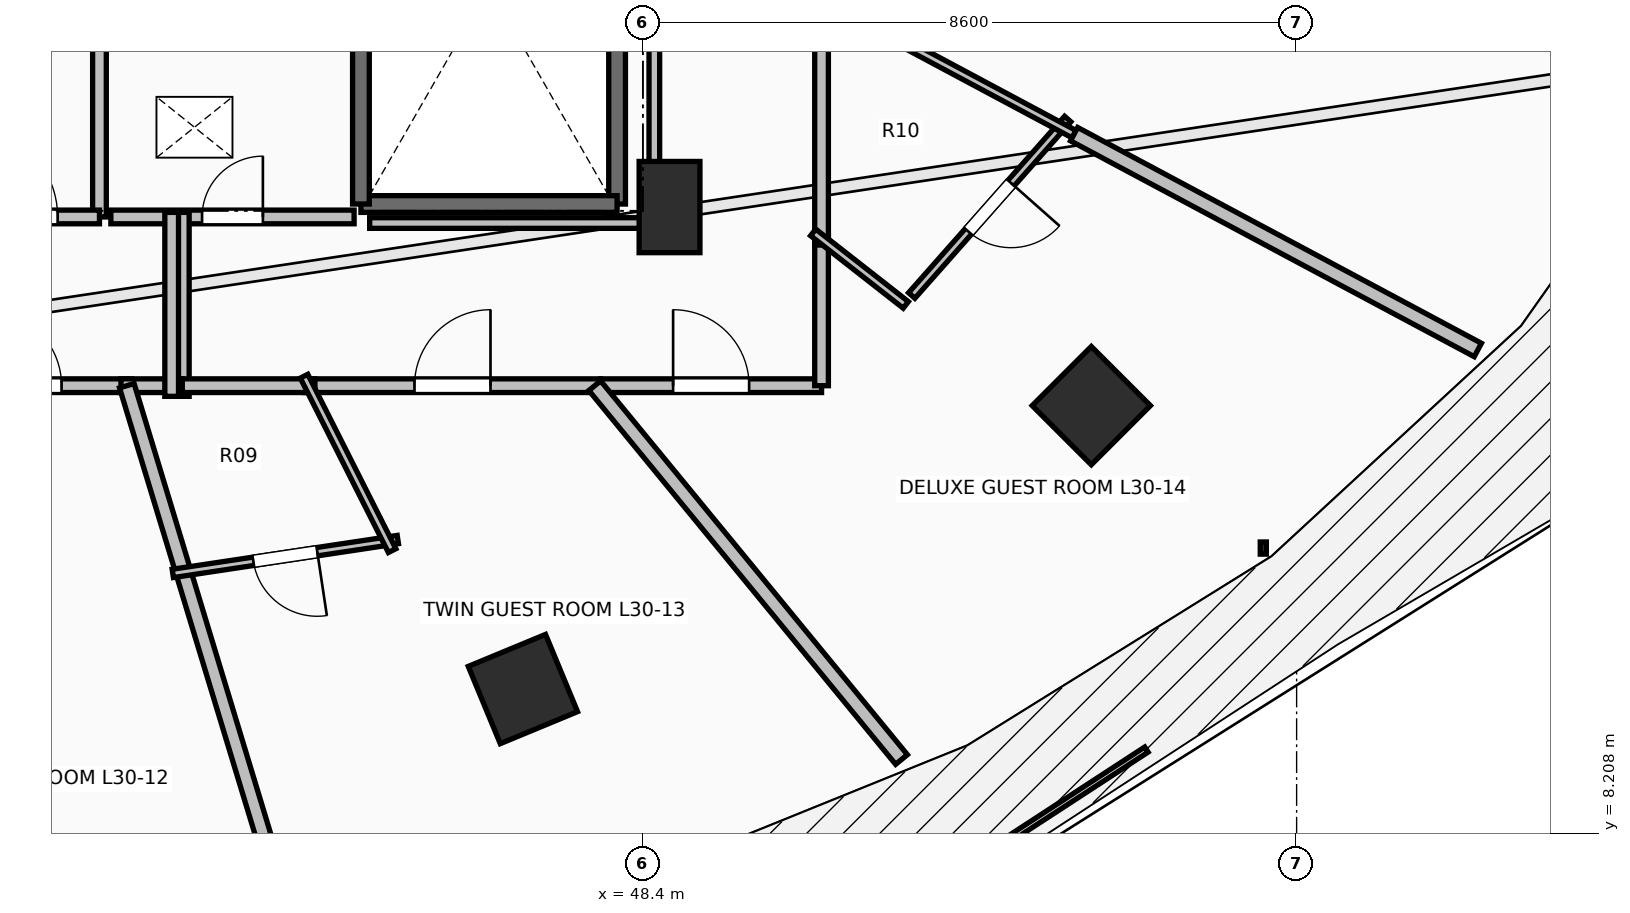
"""IFC4 building model, lengths in metres.
Left out: names, types, materials, properties, quantities, classifications, styles, units other than length and angle.
Written with IfcOpenShell. Run it as: python <this file> out.ifc"""

import sys

from ifc_helpers import new_model, si_unit, direction, frame, frame_2d, origin, origin_2d, place, context, subcontext, project, spatial, rectangle, extrude, element, fill, save


model = new_model("IFC4")
c1 = context("Model", 3, precision=1e-05, world=origin(), true_north=direction((0.0, 1.0)))
c2 = subcontext(c1, "Body", "Model", "MODEL_VIEW")
j1 = project(units=[si_unit("LENGTHUNIT", "METRE"), si_unit("PLANEANGLEUNIT", "RADIAN")], contexts=[c1])
p1 = place(None, origin())
s1 = spatial("IfcSite", under=j1, at=p1, CompositionType="ELEMENT")
p2 = place(p1, origin())
s2 = spatial("IfcBuilding", under=s1, at=p2, CompositionType="ELEMENT")
p3 = place(p2, frame((0.0, 0.0, 113.8)))
s3 = spatial("IfcBuildingStorey", under=s2, at=p3, CompositionType="ELEMENT", Elevation=113.8)
for number, where, z_axis, x_axis in (
    (1, (46.821, 10.109, 0.0), (0.0, 0.0, 1.0), (0.383, -0.924, 0.0)),
    (2, (54.299, 13.838, 0.0), (0.0, 0.0, 1.0), (0.707, -0.707, 0.0)),
):
    element("IfcColumn", number, at=place(p3, frame(where, z_axis=z_axis, x_axis=x_axis)), inside=s3, PredefinedType="COLUMN", context=c2, shape_type="SweptSolid", body=[
        extrude(rectangle(XDim=1.1, YDim=1.1, at=origin_2d()), origin(), (0.0, 0.0, 1.0), 3.5),
    ])
p4 = place(p3, frame((48.75, 16.45, 0.0), z_axis=(0.0, 0.0, 1.0), x_axis=(1.0, 0.0, 0.0)))
e3 = element("IfcColumn", 3, at=p4, inside=s3, PredefinedType="PILASTER", context=c2, shape_type="SweptSolid", body=[
    extrude(rectangle(XDim=0.8, YDim=1.2, at=origin_2d()), origin(), (0.0, 0.0, 1.0), 3.5),
])
p5 = place(p3, frame((48.06, 23.91, 0.0), z_axis=(0.0, 0.0, 1.0), x_axis=(0.0, -1.0, 0.0)))
e4 = element("IfcWall", 4, at=p5, inside=s3, PredefinedType="SOLIDWALL", context=c2, shape_type="SweptSolid", body=[
    extrude(rectangle(XDim=7.42, YDim=0.22, at=frame_2d((3.71, 0.0))), origin(), (0.0, 0.0, 1.0), 3.24),
])
p6 = place(p3, frame((48.06, 16.49, 0.0), z_axis=(0.0, 0.0, 1.0), x_axis=(-1.0, 0.0, 0.0)))
e5 = element("IfcWall", 5, at=p6, inside=s3, PredefinedType="SOLIDWALL", context=c2, shape_type="SweptSolid", body=[
    extrude(rectangle(XDim=3.37, YDim=0.22, at=frame_2d((1.685, 0.0))), origin(), (0.0, 0.0, 1.0), 3.24),
])
p7 = place(p3, frame((44.69, 16.49, 0.0), z_axis=(0.0, 0.0, 1.0), x_axis=(0.0, 1.0, 0.0)))
e6 = element("IfcWall", 6, at=p7, inside=s3, PredefinedType="SOLIDWALL", context=c2, shape_type="SweptSolid", body=[
    extrude(rectangle(XDim=7.42, YDim=0.22, at=frame_2d((3.71, 0.0))), origin(), (0.0, 0.0, 1.0), 3.24),
])
p8 = place(p3, frame((41.25, 16.32, 0.0), z_axis=(0.0, 0.0, 1.0), x_axis=(0.0, 1.0, 0.0)))
e7 = element("IfcWall", 7, at=p8, inside=s3, PredefinedType="PARTITIONING", context=c2, shape_type="SweptSolid", body=[
    extrude(rectangle(XDim=7.88, YDim=0.18, at=frame_2d((3.94, 0.0))), origin(), (0.0, 0.0, 1.0), 3.24),
])
p9 = place(p8, frame((3.54, 0.0, 0.0)))
e8 = element("IfcOpeningElement", 8, at=p9, cuts=e7, PredefinedType="OPENING", context=c2, shape_type="SweptSolid", body=[
    extrude(rectangle(XDim=0.8, YDim=2.05, at=frame_2d((0.4, 1.025))), frame((0.0, 0.105, 0.0), z_axis=(0.0, -1.0, 0.0), x_axis=(1.0, 0.0, 0.0)), (0.0, 0.0, 1.0), 0.21),
])
p10 = place(p3, frame((38.95, 16.32, 0.0), z_axis=(0.0, 0.0, 1.0), x_axis=(1.0, 0.0, 0.0)))
e9 = element("IfcWall", 9, at=p10, inside=s3, PredefinedType="PARTITIONING", context=c2, shape_type="SweptSolid", body=[
    extrude(rectangle(XDim=2.3, YDim=0.18, at=frame_2d((1.15, 0.0))), origin(), (0.0, 0.0, 1.0), 3.24),
])
p11 = place(p10, frame((0.55, 0.0, 0.0)))
e10 = element("IfcOpeningElement", 10, at=p11, cuts=e9, PredefinedType="OPENING", context=c2, shape_type="SweptSolid", body=[
    extrude(rectangle(XDim=1.2, YDim=2.15, at=frame_2d((0.6, 1.075))), frame((0.0, 0.105, 0.0), z_axis=(0.0, -1.0, 0.0), x_axis=(1.0, 0.0, 0.0)), (0.0, 0.0, 1.0), 0.21),
])
p12 = place(p3, frame((41.4, 16.32, 0.0), z_axis=(0.0, 0.0, 1.0), x_axis=(1.0, 0.0, 0.0)))
e11 = element("IfcWall", 11, at=p12, inside=s3, PredefinedType="PARTITIONING", context=c2, shape_type="SweptSolid", body=[
    extrude(rectangle(XDim=3.2, YDim=0.18, at=frame_2d((1.6, 0.0))), origin(), (0.0, 0.0, 1.0), 3.24),
])
p13 = place(p12, frame((1.2, 0.0, 0.0)))
e12 = element("IfcOpeningElement", 12, at=p13, cuts=e11, PredefinedType="OPENING", context=c2, shape_type="SweptSolid", body=[
    extrude(rectangle(XDim=0.8, YDim=2.05, at=frame_2d((0.4, 1.025))), frame((0.0, 0.105, 0.0), z_axis=(0.0, -1.0, 0.0), x_axis=(1.0, 0.0, 0.0)), (0.0, 0.0, 1.0), 0.21),
])
p14 = place(p3, frame((38.83, 14.1, 0.0), z_axis=(0.0, 0.0, 1.0), x_axis=(1.0, 0.0, 0.0)))
e13 = element("IfcWall", 13, at=p14, inside=s3, PredefinedType="PARTITIONING", context=c2, shape_type="SweptSolid", body=[
    extrude(rectangle(XDim=2.843, YDim=0.18, at=frame_2d((1.421, 0.0))), origin(), (0.0, 0.0, 1.0), 2.929),
])
p15 = place(p14, frame((0.921, 0.0, 0.0)))
e14 = element("IfcOpeningElement", 14, at=p15, cuts=e13, PredefinedType="OPENING", context=c2, shape_type="SweptSolid", body=[
    extrude(rectangle(XDim=1.0, YDim=2.15, at=frame_2d((0.5, 1.075))), frame((0.0, 0.105, 0.0), z_axis=(0.0, -1.0, 0.0), x_axis=(1.0, 0.0, 0.0)), (0.0, 0.0, 1.0), 0.21),
])
p16 = place(p3, frame((43.945, 14.1, 0.0), z_axis=(0.0, 0.0, 1.0), x_axis=(1.0, 0.0, 0.0)))
e15 = element("IfcWall", 15, at=p16, inside=s3, PredefinedType="PARTITIONING", context=c2, shape_type="SweptSolid", body=[
    extrude(rectangle(XDim=3.899, YDim=0.18, at=frame_2d((1.949, 0.0))), origin(), (0.0, 0.0, 1.0), 2.432),
])
p17 = place(p16, frame((1.449, 0.0, 0.0)))
e16 = element("IfcOpeningElement", 16, at=p17, cuts=e15, PredefinedType="OPENING", context=c2, shape_type="SweptSolid", body=[
    extrude(rectangle(XDim=1.0, YDim=2.15, at=frame_2d((0.5, 1.075))), frame((0.0, 0.105, 0.0), z_axis=(0.0, -1.0, 0.0), x_axis=(1.0, 0.0, 0.0)), (0.0, 0.0, 1.0), 0.21),
])
p18 = place(p3, frame((42.34, 16.38, 0.0), z_axis=(0.0, 0.0, 1.0), x_axis=(0.0, -1.0, 0.0)))
e17 = element("IfcWall", 17, at=p18, inside=s3, PredefinedType="PARTITIONING", context=c2, shape_type="SweptSolid", body=[
    extrude(rectangle(XDim=2.42, YDim=0.18, at=frame_2d((1.21, 0.0))), origin(), (0.0, 0.0, 1.0), 2.929),
])
p19 = place(p3, frame((42.2, 14.1, 0.0), z_axis=(0.0, 0.0, 1.0), x_axis=(1.0, 0.0, 0.0)))
e18 = element("IfcWall", 18, at=p19, inside=s3, PredefinedType="PARTITIONING", context=c2, shape_type="SweptSolid", body=[
    extrude(rectangle(XDim=1.885, YDim=0.18, at=frame_2d((0.942, 0.0))), origin(), (0.0, 0.0, 1.0), 2.929),
])
p20 = place(p3, frame((41.533, 14.1, 0.0), z_axis=(0.0, 0.0, 1.0), x_axis=(1.0, 0.0, 0.0)))
e19 = element("IfcWall", 19, at=p20, inside=s3, PredefinedType="PARTITIONING", context=c2, shape_type="SweptSolid", body=[
    extrude(rectangle(XDim=0.807, YDim=0.18, at=frame_2d((0.404, 0.0))), origin(), (0.0, 0.0, 1.0), 2.929),
])
p21 = place(p3, frame((42.2, 13.96, 0.0), z_axis=(0.0, 0.0, 1.0), x_axis=(0.0, 1.0, 0.0)))
e20 = element("IfcWall", 20, at=p21, inside=s3, PredefinedType="PARTITIONING", context=c2, shape_type="SweptSolid", body=[
    extrude(rectangle(XDim=2.42, YDim=0.18, at=frame_2d((1.21, 0.0))), origin(), (0.0, 0.0, 1.0), 2.929),
])
p22 = place(p3, frame((47.844, 14.1, 0.0), z_axis=(0.0, 0.0, 1.0), x_axis=(1.0, 0.0, 0.0)))
e21 = element("IfcWall", 21, at=p22, inside=s3, PredefinedType="PARTITIONING", context=c2, shape_type="SweptSolid", body=[
    extrude(rectangle(XDim=2.906, YDim=0.18, at=frame_2d((1.453, 0.0))), origin(), (0.0, 0.0, 1.0), 2.432),
])
p23 = place(p22, frame((0.953, 0.0, 0.0)))
e22 = element("IfcOpeningElement", 22, at=p23, cuts=e21, PredefinedType="OPENING", context=c2, shape_type="SweptSolid", body=[
    extrude(rectangle(XDim=1.0, YDim=2.15, at=frame_2d((0.5, 1.075))), frame((0.0, 0.105, 0.0), z_axis=(0.0, -1.0, 0.0), x_axis=(1.0, 0.0, 0.0)), (0.0, 0.0, 1.0), 0.21),
])
p24 = place(p3, frame((50.75, 14.1, 0.0), z_axis=(0.0, 0.0, 1.0), x_axis=(0.0, 1.0, 0.0)))
e23 = element("IfcWall", 23, at=p24, inside=s3, PredefinedType="PARTITIONING", context=c2, shape_type="SweptSolid", body=[
    extrude(rectangle(XDim=1.99, YDim=0.18, at=frame_2d((0.995, 0.0))), origin(), (0.0, 0.0, 1.0), 2.432),
])
p25 = place(p3, frame((50.75, 15.95, 0.0), z_axis=(0.0, 0.0, 1.0), x_axis=(0.0, 1.0, 0.0)))
e24 = element("IfcWall", 24, at=p25, inside=s3, PredefinedType="PARTITIONING", context=c2, shape_type="SweptSolid", body=[
    extrude(rectangle(XDim=3.435, YDim=0.18, at=frame_2d((1.718, 0.0))), origin(), (0.0, 0.0, 1.0), 2.929),
])
p26 = place(p3, frame((43.855, 6.7, 0.0), z_axis=(0.0, 0.0, 1.0), x_axis=(-0.290292155577, 0.956938067176, 0.0)))
e25 = element("IfcWall", 25, at=p26, inside=s3, PredefinedType="PARTITIONING", context=c2, shape_type="SweptSolid", body=[
    extrude(rectangle(XDim=7.733, YDim=0.2, at=frame_2d((3.867, 0.0))), origin(), (0.0, 0.0, 1.0), 2.432),
])
p27 = place(p3, frame((45.175, 12.076, 0.0), z_axis=(0.0, 0.0, 1.0), x_axis=(-0.988865063855, -0.148814937044, 0.0)))
e26 = element("IfcWall", 26, at=p27, inside=s3, PredefinedType="PARTITIONING", context=c2, shape_type="SweptSolid", body=[
    extrude(rectangle(XDim=2.994, YDim=0.11, at=frame_2d((1.497, 0.0))), origin(), (0.0, 0.0, 1.0), 2.432),
])
p28 = place(p27, frame((1.072, 0.0, 0.0)))
e27 = element("IfcOpeningElement", 27, at=p28, cuts=e26, PredefinedType="OPENING", context=c2, shape_type="SweptSolid", body=[
    extrude(rectangle(XDim=0.85, YDim=2.1, at=frame_2d((0.425, 1.05))), frame((0.0, 0.07, 0.0), z_axis=(0.0, -1.0, 0.0), x_axis=(1.0, 0.0, 0.0)), (0.0, 0.0, 1.0), 0.14),
])
p29 = place(p3, frame((43.942, 14.225, 0.0), z_axis=(0.0, 0.0, 1.0), x_axis=(0.450515334881, -0.892768689548, 0.0)))
e28 = element("IfcWall", 28, at=p29, inside=s3, PredefinedType="PARTITIONING", context=c2, shape_type="SweptSolid", body=[
    extrude(rectangle(XDim=2.571, YDim=0.11, at=frame_2d((1.285, 0.0))), origin(), (0.0, 0.0, 1.0), 2.432),
])
p30 = place(p3, frame((51.802, 9.182, 0.0), z_axis=(0.0, 0.0, 1.0), x_axis=(-0.634357186002, 0.773040076948, 0.0)))
e29 = element("IfcWall", 29, at=p30, inside=s3, PredefinedType="PARTITIONING", context=c2, shape_type="SweptSolid", body=[
    extrude(rectangle(XDim=6.362, YDim=0.2, at=frame_2d((3.181, 0.0))), origin(), (0.0, 0.0, 1.0), 2.432),
])
p31 = place(p3, frame((53.989, 17.608, 0.0), z_axis=(0.0, 0.0, 1.0), x_axis=(-0.662322264705, -0.749219071885, 0.0)))
e30 = element("IfcWall", 30, at=p31, inside=s3, PredefinedType="PARTITIONING", context=c2, shape_type="SweptSolid", body=[
    extrude(rectangle(XDim=3.099, YDim=0.11, at=frame_2d((1.549, 0.0))), origin(), (0.0, 0.0, 1.0), 2.886),
])
p32 = place(p31, frame((1.125, 0.0, 0.0)))
e31 = element("IfcOpeningElement", 31, at=p32, cuts=e30, PredefinedType="OPENING", context=c2, shape_type="SweptSolid", body=[
    extrude(rectangle(XDim=0.85, YDim=2.1, at=frame_2d((0.425, 1.05))), frame((0.0, 0.07, 0.0), z_axis=(0.0, -1.0, 0.0), x_axis=(1.0, 0.0, 0.0)), (0.0, 0.0, 1.0), 0.14),
])
p33 = place(p3, frame((51.858, 15.163, 0.0), z_axis=(0.0, 0.0, 1.0), x_axis=(-0.787564922247, 0.61623168796, 0.0)))
e32 = element("IfcWall", 32, at=p33, inside=s3, PredefinedType="PARTITIONING", context=c2, shape_type="SweptSolid", body=[
    extrude(rectangle(XDim=1.548, YDim=0.11, at=frame_2d((0.774, 0.0))), origin(), (0.0, 0.0, 1.0), 2.432),
])
p34 = place(p3, frame((54.073, 17.409, 0.0), z_axis=(0.0, 0.0, 1.0), x_axis=(-0.881911515214, 0.47141497572, 0.0)))
e33 = element("IfcWall", 33, at=p34, inside=s3, PredefinedType="PARTITIONING", context=c2, shape_type="SweptSolid", body=[
    extrude(rectangle(XDim=3.907, YDim=0.11, at=frame_2d((1.954, 0.0))), origin(), (0.0, 0.0, 1.0), 2.886),
])
p35 = place(p3, frame((59.384, 14.57, 0.0), z_axis=(0.0, 0.0, 1.0), x_axis=(-0.881918302895, 0.471402277274, 0.0)))
e34 = element("IfcWall", 34, at=p35, inside=s3, PredefinedType="PARTITIONING", context=c2, shape_type="SweptSolid", body=[
    extrude(rectangle(XDim=6.023, YDim=0.2, at=frame_2d((3.011, 0.0))), origin(), (0.0, 0.0, 1.0), 2.677),
])
p36 = place(p3, frame((48.55, 23.754, 0.0), z_axis=(0.0, 0.0, 1.0), x_axis=(0.0, -1.0, 0.0)))
e35 = element("IfcWall", 35, at=p36, inside=s3, PredefinedType="PARTITIONING", context=c2, shape_type="SweptSolid", body=[
    extrude(rectangle(XDim=7.514, YDim=0.14, at=frame_2d((3.757, 0.0))), origin(), (0.0, 0.0, 1.0), 2.432),
])
p37 = place(p3, frame((48.55, 16.24, 0.0), z_axis=(0.0, 0.0, 1.0), x_axis=(-1.0, 0.0, 0.0)))
e36 = element("IfcWall", 36, at=p37, inside=s3, PredefinedType="PARTITIONING", context=c2, shape_type="SweptSolid", body=[
    extrude(rectangle(XDim=3.745, YDim=0.14, at=frame_2d((1.873, 0.0))), origin(), (0.0, 0.0, 1.0), 2.432),
])
p38 = place(p11, origin())
e37 = element("IfcDoor", 37, at=p38, inside=s3, OperationType="SINGLE_SWING_LEFT", PredefinedType="DOOR", context=c2, shape_type="SweptSolid", body=[
    extrude(rectangle(XDim=1.2, YDim=2.15, at=frame_2d((0.6, 1.075))), frame((0.0, 0.025, 0.0), z_axis=(0.0, -1.0, 0.0), x_axis=(1.0, 0.0, 0.0)), (0.0, 0.0, 1.0), 0.05),
])
fill(e10, e37)
p39 = place(p13, origin())
e38 = element("IfcDoor", 38, at=p39, inside=s3, OperationType="SINGLE_SWING_RIGHT", PredefinedType="DOOR", context=c2, shape_type="SweptSolid", body=[
    extrude(rectangle(XDim=0.8, YDim=2.05, at=frame_2d((0.4, 1.025))), frame((0.0, 0.025, 0.0), z_axis=(0.0, -1.0, 0.0), x_axis=(1.0, 0.0, 0.0)), (0.0, 0.0, 1.0), 0.05),
])
fill(e12, e38)
p40 = place(p15, origin())
e39 = element("IfcDoor", 39, at=p40, inside=s3, OperationType="SINGLE_SWING_LEFT", PredefinedType="DOOR", context=c2, shape_type="SweptSolid", body=[
    extrude(rectangle(XDim=1.0, YDim=2.15, at=frame_2d((0.5, 1.075))), frame((0.0, 0.025, 0.0), z_axis=(0.0, -1.0, 0.0), x_axis=(1.0, 0.0, 0.0)), (0.0, 0.0, 1.0), 0.05),
])
fill(e14, e39)
p41 = place(p17, origin())
e40 = element("IfcDoor", 40, at=p41, inside=s3, OperationType="SINGLE_SWING_RIGHT", PredefinedType="DOOR", context=c2, shape_type="SweptSolid", body=[
    extrude(rectangle(XDim=1.0, YDim=2.15, at=frame_2d((0.5, 1.075))), frame((0.0, 0.025, 0.0), z_axis=(0.0, -1.0, 0.0), x_axis=(1.0, 0.0, 0.0)), (0.0, 0.0, 1.0), 0.05),
])
fill(e16, e40)
p42 = place(p23, origin())
e41 = element("IfcDoor", 41, at=p42, inside=s3, OperationType="SINGLE_SWING_LEFT", PredefinedType="DOOR", context=c2, shape_type="SweptSolid", body=[
    extrude(rectangle(XDim=1.0, YDim=2.15, at=frame_2d((0.5, 1.075))), frame((0.0, 0.025, 0.0), z_axis=(0.0, -1.0, 0.0), x_axis=(1.0, 0.0, 0.0)), (0.0, 0.0, 1.0), 0.05),
])
fill(e22, e41)
p43 = place(p28, origin())
e42 = element("IfcDoor", 42, at=p43, inside=s3, OperationType="SINGLE_SWING_LEFT", PredefinedType="DOOR", context=c2, shape_type="SweptSolid", body=[
    extrude(rectangle(XDim=0.85, YDim=2.1, at=frame_2d((0.425, 1.05))), frame((0.0, 0.025, 0.0), z_axis=(0.0, -1.0, 0.0), x_axis=(1.0, 0.0, 0.0)), (0.0, 0.0, 1.0), 0.05),
])
fill(e27, e42)
p44 = place(p32, origin())
e43 = element("IfcDoor", 43, at=p44, inside=s3, OperationType="SINGLE_SWING_LEFT", PredefinedType="DOOR", context=c2, shape_type="SweptSolid", body=[
    extrude(rectangle(XDim=0.85, YDim=2.1, at=frame_2d((0.425, 1.05))), frame((0.0, 0.025, 0.0), z_axis=(0.0, -1.0, 0.0), x_axis=(1.0, 0.0, 0.0)), (0.0, 0.0, 1.0), 0.05),
])
fill(e31, e43)
save(model, sys.argv[1])
